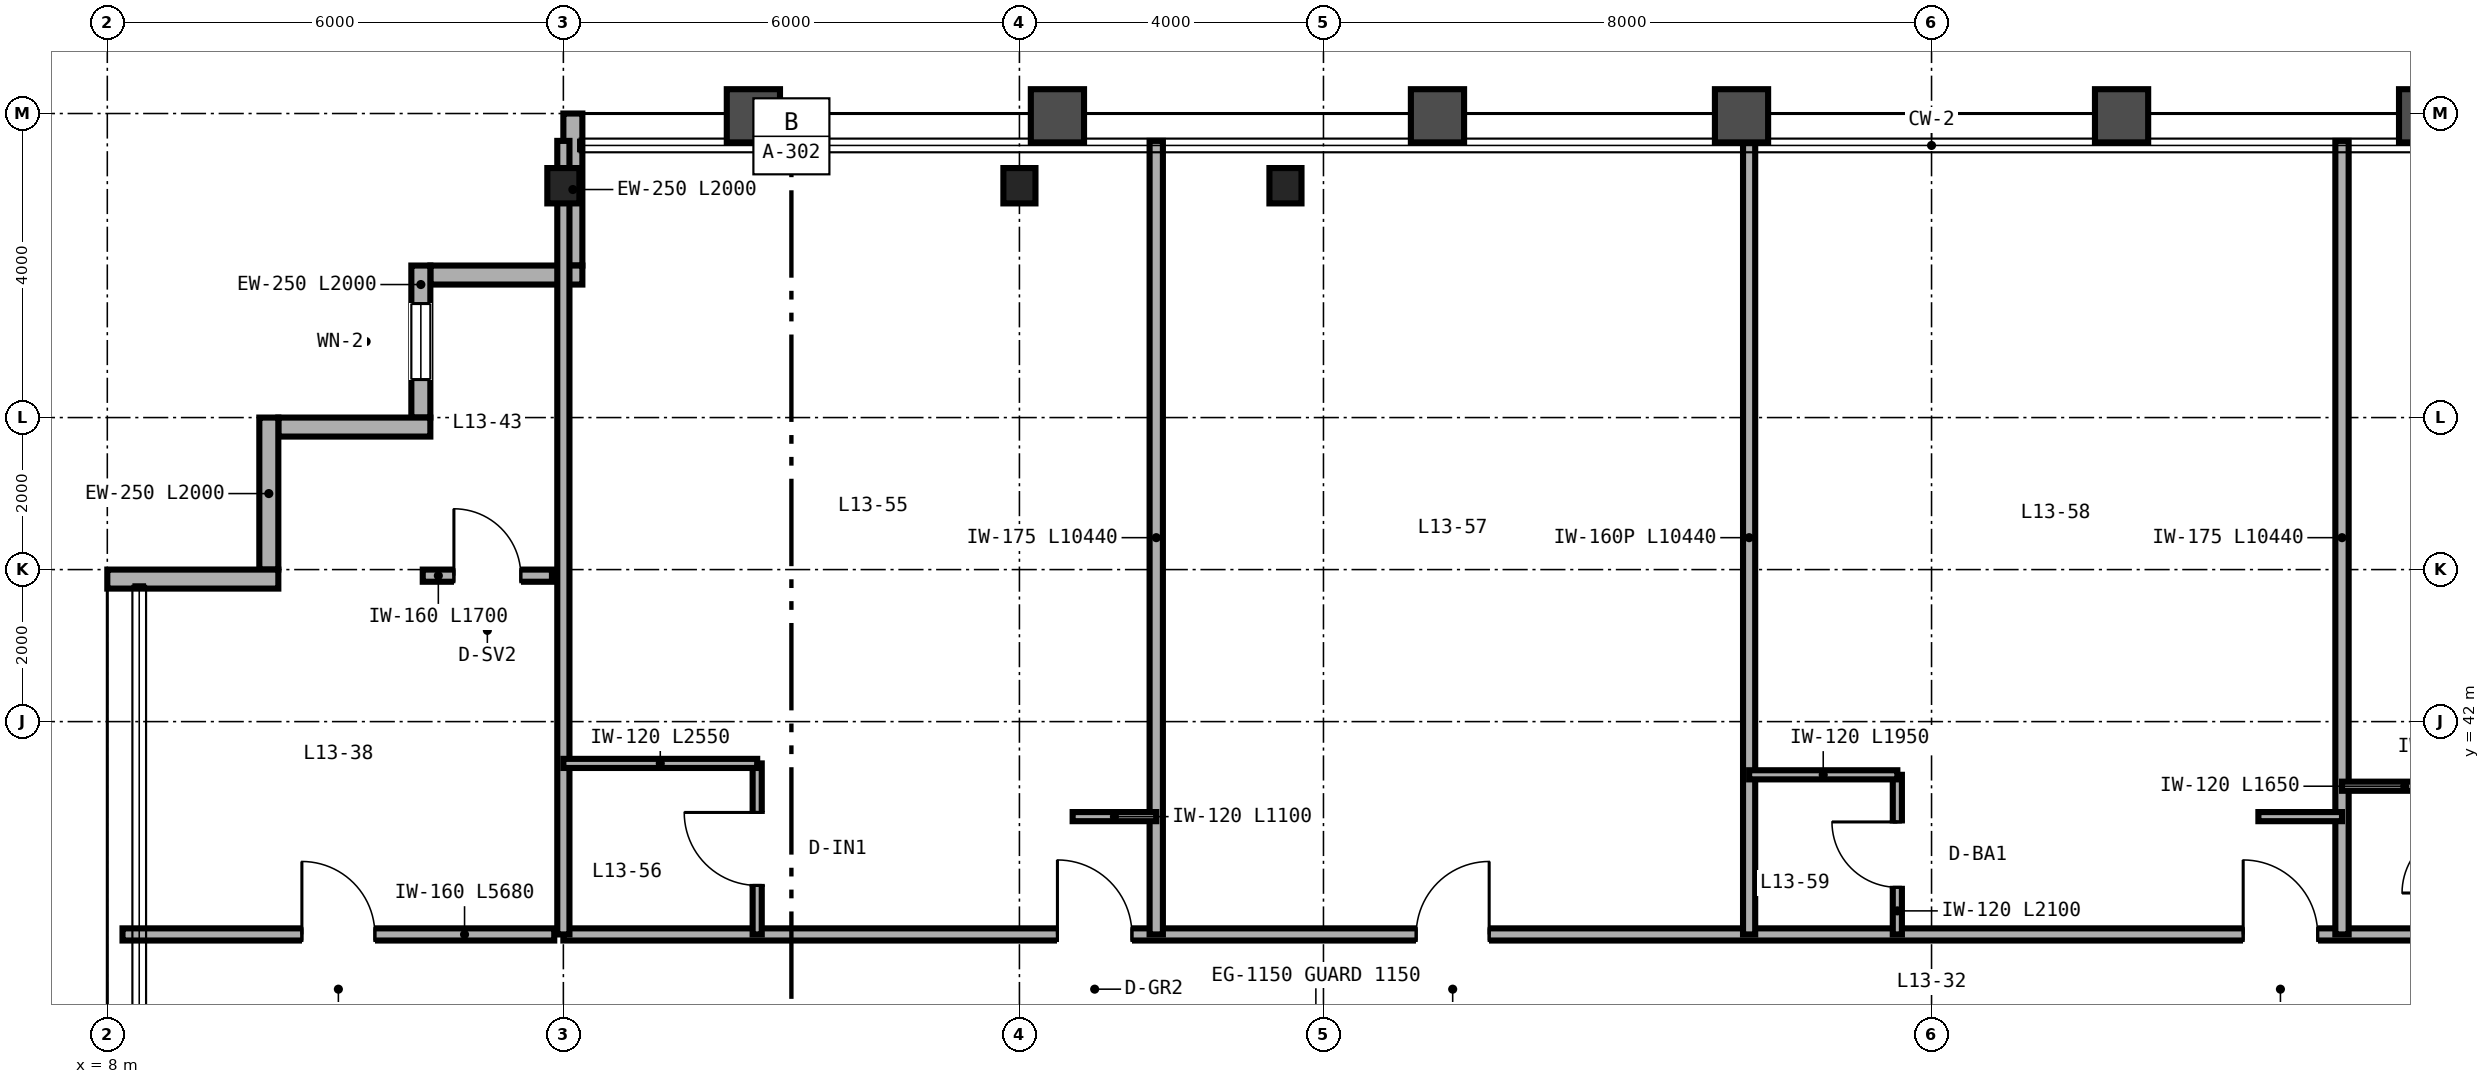
"""IFC4 building model, lengths in metres.
Left out: names, types, materials, properties, quantities, classifications, styles, units other than length and angle.
Written with IfcOpenShell. Run it as: python <this file> out.ifc"""

import sys

from ifc_helpers import new_model, si_unit, direction, frame, frame_2d, origin, origin_2d, place, context, subcontext, project, spatial, rectangle, i_section, extrude, source, transform, mapped, element, fill, save


model = new_model("IFC4")
c1 = context("Model", 3, precision=1e-05, world=origin(), true_north=direction((0.0, 1.0)))
c2 = subcontext(c1, "Body", "Model", "MODEL_VIEW")
j1 = project(units=[si_unit("LENGTHUNIT", "METRE"), si_unit("PLANEANGLEUNIT", "RADIAN")], contexts=[c1])
p1 = place(None, origin())
s1 = spatial("IfcSite", under=j1, at=p1, CompositionType="ELEMENT")
p2 = place(p1, origin())
s2 = spatial("IfcBuilding", under=s1, at=p2, CompositionType="ELEMENT")
p3 = place(p2, frame((0.0, 0.0, 56.4)))
s3 = spatial("IfcBuildingStorey", under=s2, at=p3, CompositionType="ELEMENT", Elevation=56.4)
m1 = source(origin(), c2, "Body", "SweptSolid", [
    extrude(i_section(OverallWidth=0.422, OverallDepth=0.465, WebThickness=0.045, FlangeThickness=0.073, FilletRadius=0.025, at=origin_2d()), origin(), (0.0, 0.0, 1.0), 3.35),
])
for number, where, z_axis, x_axis in (
    (1, (14.0, 49.05, 0.0), (0.0, 0.0, 1.0), (1.0, 0.0, 0.0)),
    (2, (20.0, 49.05, 0.0), (0.0, 0.0, 1.0), (1.0, 0.0, 0.0)),
    (3, (23.5, 49.05, 0.0), (0.0, 0.0, 1.0), (1.0, 0.0, 0.0)),
):
    element("IfcColumn", number, at=place(p3, frame(where, z_axis=z_axis, x_axis=x_axis)), inside=s3, PredefinedType="COLUMN", context=c2, shape_type="MappedRepresentation", body=[
        mapped(m1, transform((0.0, 0.0, 0.0), scale=1.0)),
    ])
p4 = place(p3, frame((14.125, 50.0, 0.0), z_axis=(0.0, 0.0, 1.0), x_axis=(0.0, -1.0, 0.0)))
e4 = element("IfcWall", 4, at=p4, inside=s3, PredefinedType="SOLIDWALL", context=c2, shape_type="SweptSolid", body=[
    extrude(rectangle(XDim=2.0, YDim=0.25, at=frame_2d((1.0, 0.0))), origin(), (0.0, 0.0, 1.0), 2.657),
])
p5 = place(p3, frame((14.25, 47.875, 0.0), z_axis=(0.0, 0.0, 1.0), x_axis=(-1.0, 0.0, 0.0)))
e5 = element("IfcWall", 5, at=p5, inside=s3, PredefinedType="SOLIDWALL", context=c2, shape_type="SweptSolid", body=[
    extrude(rectangle(XDim=2.0, YDim=0.25, at=frame_2d((1.0, 0.0))), origin(), (0.0, 0.0, 1.0), 3.35),
])
p6 = place(p3, frame((12.125, 48.0, 0.0), z_axis=(0.0, 0.0, 1.0), x_axis=(0.0, -1.0, 0.0)))
e6 = element("IfcWall", 6, at=p6, inside=s3, PredefinedType="SOLIDWALL", context=c2, shape_type="SweptSolid", body=[
    extrude(rectangle(XDim=2.0, YDim=0.25, at=frame_2d((1.0, 0.0))), origin(), (0.0, 0.0, 1.0), 3.35),
])
p7 = place(p6, frame((0.5, 0.0, 0.85)))
e7 = element("IfcOpeningElement", 7, at=p7, cuts=e6, PredefinedType="OPENING", context=c2, shape_type="SweptSolid", body=[
    extrude(rectangle(XDim=1.0, YDim=1.9, at=frame_2d((0.5, 0.95))), frame((0.0, 0.135, 0.0), z_axis=(0.0, -1.0, 0.0), x_axis=(1.0, 0.0, 0.0)), (0.0, 0.0, 1.0), 0.27),
])
for number, where, z_axis, x_axis in (
    (8, (12.25, 45.875, 0.0), (0.0, 0.0, 1.0), (-1.0, 0.0, 0.0)),
    (9, (10.125, 46.0, 0.0), (0.0, 0.0, 1.0), (0.0, -1.0, 0.0)),
):
    element("IfcWall", number, at=place(p3, frame(where, z_axis=z_axis, x_axis=x_axis)), inside=s3, PredefinedType="SOLIDWALL", context=c2, shape_type="SweptSolid", body=[
        extrude(rectangle(XDim=2.0, YDim=0.25, at=frame_2d((1.0, 0.0))), origin(), (0.0, 0.0, 1.0), 3.35),
    ])
p8 = place(p3, frame((10.25, 43.875, 0.0), z_axis=(0.0, 0.0, 1.0), x_axis=(-1.0, 0.0, 0.0)))
e10 = element("IfcWall", 10, at=p8, inside=s3, PredefinedType="SOLIDWALL", context=c2, shape_type="SweptSolid", body=[
    extrude(rectangle(XDim=2.25, YDim=0.25, at=frame_2d((1.125, 0.0))), origin(), (0.0, 0.0, 1.0), 3.35),
])
p9 = place(p3, frame((8.2, 39.2, 0.0), z_axis=(0.0, 0.0, 1.0), x_axis=(1.0, 0.0, 0.0)))
e11 = element("IfcWall", 11, at=p9, inside=s3, PredefinedType="PARTITIONING", context=c2, shape_type="SweptSolid", body=[
    extrude(rectangle(XDim=5.68, YDim=0.16, at=frame_2d((2.84, 0.0))), origin(), (0.0, 0.0, 1.0), 3.35),
])
p10 = place(p9, frame((2.36, 0.0, 0.0)))
e12 = element("IfcOpeningElement", 12, at=p10, cuts=e11, PredefinedType="OPENING", context=c2, shape_type="SweptSolid", body=[
    extrude(rectangle(XDim=0.96, YDim=2.15, at=frame_2d((0.48, 1.075))), frame((0.0, 0.09, 0.0), z_axis=(0.0, -1.0, 0.0), x_axis=(1.0, 0.0, 0.0)), (0.0, 0.0, 1.0), 0.18),
])
p11 = place(p3, frame((12.15, 43.92, 0.0), z_axis=(0.0, 0.0, 1.0), x_axis=(1.0, 0.0, 0.0)))
e13 = element("IfcWall", 13, at=p11, inside=s3, PredefinedType="PARTITIONING", context=c2, shape_type="SweptSolid", body=[
    extrude(rectangle(XDim=1.7, YDim=0.16, at=frame_2d((0.85, 0.0))), origin(), (0.0, 0.0, 1.0), 3.35),
])
p12 = place(p11, frame((0.41, 0.0, 0.0)))
e14 = element("IfcOpeningElement", 14, at=p12, cuts=e13, PredefinedType="OPENING", context=c2, shape_type="SweptSolid", body=[
    extrude(rectangle(XDim=0.88, YDim=2.15, at=frame_2d((0.44, 1.075))), frame((0.0, 0.09, 0.0), z_axis=(0.0, -1.0, 0.0), x_axis=(1.0, 0.0, 0.0)), (0.0, 0.0, 1.0), 0.18),
])
p13 = place(p3, frame((14.0, 39.2, 0.0), z_axis=(0.0, 0.0, 1.0), x_axis=(1.0, 0.0, 0.0)))
e15 = element("IfcWall", 15, at=p13, inside=s3, PredefinedType="PARTITIONING", context=c2, shape_type="SweptSolid", body=[
    extrude(rectangle(XDim=36.0, YDim=0.16, at=frame_2d((18.0, 0.0))), origin(), (0.0, 0.0, 1.0), 2.571),
])
p14 = place(p13, frame((6.5, 0.0, 0.0)))
e16 = element("IfcOpeningElement", 16, at=p14, cuts=e15, PredefinedType="OPENING", context=c2, shape_type="SweptSolid", body=[
    extrude(rectangle(XDim=0.98, YDim=2.2, at=frame_2d((0.49, 1.1))), frame((0.0, 0.09, 0.0), z_axis=(0.0, -1.0, 0.0), x_axis=(1.0, 0.0, 0.0)), (0.0, 0.0, 1.0), 0.18),
])
p15 = place(p13, frame((11.22, 0.0, 0.0)))
e17 = element("IfcOpeningElement", 17, at=p15, cuts=e15, PredefinedType="OPENING", context=c2, shape_type="SweptSolid", body=[
    extrude(rectangle(XDim=0.96, YDim=2.15, at=frame_2d((0.48, 1.075))), frame((0.0, 0.09, 0.0), z_axis=(0.0, -1.0, 0.0), x_axis=(1.0, 0.0, 0.0)), (0.0, 0.0, 1.0), 0.18),
])
p16 = place(p13, frame((22.1, 0.0, 0.0)))
e18 = element("IfcOpeningElement", 18, at=p16, cuts=e15, PredefinedType="OPENING", context=c2, shape_type="SweptSolid", body=[
    extrude(rectangle(XDim=0.98, YDim=2.2, at=frame_2d((0.49, 1.1))), frame((0.0, 0.09, 0.0), z_axis=(0.0, -1.0, 0.0), x_axis=(1.0, 0.0, 0.0)), (0.0, 0.0, 1.0), 0.18),
])
p17 = place(p13, frame((28.94, 0.0, 0.0)))
e19 = element("IfcOpeningElement", 19, at=p17, cuts=e15, PredefinedType="OPENING", context=c2, shape_type="SweptSolid", body=[
    extrude(rectangle(XDim=0.94, YDim=2.15, at=frame_2d((0.47, 1.075))), frame((0.0, 0.09, 0.0), z_axis=(0.0, -1.0, 0.0), x_axis=(1.0, 0.0, 0.0)), (0.0, 0.0, 1.0), 0.18),
])
p18 = place(p13, frame((34.74, 0.0, 0.0)))
e20 = element("IfcOpeningElement", 20, at=p18, cuts=e15, PredefinedType="OPENING", context=c2, shape_type="SweptSolid", body=[
    extrude(rectangle(XDim=0.94, YDim=2.15, at=frame_2d((0.47, 1.075))), frame((0.0, 0.09, 0.0), z_axis=(0.0, -1.0, 0.0), x_axis=(1.0, 0.0, 0.0)), (0.0, 0.0, 1.0), 0.18),
])
p19 = place(p3, frame((14.0, 39.2, 0.0), z_axis=(0.0, 0.0, 1.0), x_axis=(0.0, 1.0, 0.0)))
e21 = element("IfcWall", 21, at=p19, inside=s3, PredefinedType="PARTITIONING", context=c2, shape_type="SweptSolid", body=[
    extrude(rectangle(XDim=10.44, YDim=0.16, at=frame_2d((5.22, 0.0))), origin(), (0.0, 0.0, 1.0), 2.657),
])
p20 = place(p3, frame((21.8, 39.2, 0.0), z_axis=(0.0, 0.0, 1.0), x_axis=(0.0, 1.0, 0.0)))
e22 = element("IfcWall", 22, at=p20, inside=s3, PredefinedType="PARTITIONING", context=c2, shape_type="SweptSolid", body=[
    extrude(rectangle(XDim=10.44, YDim=0.175, at=frame_2d((5.22, 0.0))), origin(), (0.0, 0.0, 1.0), 2.813),
])
p21 = place(p3, frame((16.55, 39.2, 0.0), z_axis=(0.0, 0.0, 1.0), x_axis=(0.0, 1.0, 0.0)))
e23 = element("IfcWall", 23, at=p21, inside=s3, PredefinedType="PARTITIONING", context=c2, shape_type="SweptSolid", body=[
    extrude(rectangle(XDim=2.25, YDim=0.12, at=frame_2d((1.125, 0.0))), origin(), (0.0, 0.0, 1.0), 3.35),
])
p22 = place(p21, frame((0.645, 0.0, 0.0)))
e24 = element("IfcOpeningElement", 24, at=p22, cuts=e23, PredefinedType="OPENING", context=c2, shape_type="SweptSolid", body=[
    extrude(rectangle(XDim=0.96, YDim=2.15, at=frame_2d((0.48, 1.075))), frame((0.0, 0.07, 0.0), z_axis=(0.0, -1.0, 0.0), x_axis=(1.0, 0.0, 0.0)), (0.0, 0.0, 1.0), 0.14),
])
p23 = place(p3, frame((14.0, 41.45, 0.0), z_axis=(0.0, 0.0, 1.0), x_axis=(1.0, 0.0, 0.0)))
e25 = element("IfcWall", 25, at=p23, inside=s3, PredefinedType="PARTITIONING", context=c2, shape_type="SweptSolid", body=[
    extrude(rectangle(XDim=2.55, YDim=0.12, at=frame_2d((1.275, 0.0))), origin(), (0.0, 0.0, 1.0), 3.35),
])
p24 = place(p3, frame((20.7, 40.75, 0.0), z_axis=(0.0, 0.0, 1.0), x_axis=(1.0, 0.0, 0.0)))
e26 = element("IfcWall", 26, at=p24, inside=s3, PredefinedType="PARTITIONING", context=c2, shape_type="SweptSolid", body=[
    extrude(rectangle(XDim=1.1, YDim=0.12, at=frame_2d((0.55, 0.0))), origin(), (0.0, 0.0, 1.0), 3.35),
])
p25 = place(p3, frame((29.6, 39.2, 0.0), z_axis=(0.0, 0.0, 1.0), x_axis=(0.0, 1.0, 0.0)))
e27 = element("IfcWall", 27, at=p25, inside=s3, PredefinedType="PARTITIONING", context=c2, shape_type="SweptSolid", body=[
    extrude(rectangle(XDim=10.44, YDim=0.16, at=frame_2d((5.22, 0.0))), origin(), (0.0, 0.0, 1.0), 2.423),
])
p26 = place(p3, frame((37.4, 39.2, 0.0), z_axis=(0.0, 0.0, 1.0), x_axis=(0.0, 1.0, 0.0)))
e28 = element("IfcWall", 28, at=p26, inside=s3, PredefinedType="PARTITIONING", context=c2, shape_type="SweptSolid", body=[
    extrude(rectangle(XDim=10.44, YDim=0.175, at=frame_2d((5.22, 0.0))), origin(), (0.0, 0.0, 1.0), 2.423),
])
p27 = place(p3, frame((31.55, 39.2, 0.0), z_axis=(0.0, 0.0, 1.0), x_axis=(0.0, 1.0, 0.0)))
e29 = element("IfcWall", 29, at=p27, inside=s3, PredefinedType="PARTITIONING", context=c2, shape_type="SweptSolid", body=[
    extrude(rectangle(XDim=2.1, YDim=0.12, at=frame_2d((1.05, 0.0))), origin(), (0.0, 0.0, 1.0), 3.35),
])
p28 = place(p27, frame((0.62, 0.0, 0.0)))
e30 = element("IfcOpeningElement", 30, at=p28, cuts=e29, PredefinedType="OPENING", context=c2, shape_type="SweptSolid", body=[
    extrude(rectangle(XDim=0.86, YDim=2.1, at=frame_2d((0.43, 1.05))), frame((0.0, 0.07, 0.0), z_axis=(0.0, -1.0, 0.0), x_axis=(1.0, 0.0, 0.0)), (0.0, 0.0, 1.0), 0.14),
])
p29 = place(p3, frame((29.6, 41.3, 0.0), z_axis=(0.0, 0.0, 1.0), x_axis=(1.0, 0.0, 0.0)))
e31 = element("IfcWall", 31, at=p29, inside=s3, PredefinedType="PARTITIONING", context=c2, shape_type="SweptSolid", body=[
    extrude(rectangle(XDim=1.95, YDim=0.12, at=frame_2d((0.975, 0.0))), origin(), (0.0, 0.0, 1.0), 3.35),
])
p30 = place(p3, frame((36.3, 40.75, 0.0), z_axis=(0.0, 0.0, 1.0), x_axis=(1.0, 0.0, 0.0)))
e32 = element("IfcWall", 32, at=p30, inside=s3, PredefinedType="PARTITIONING", context=c2, shape_type="SweptSolid", body=[
    extrude(rectangle(XDim=1.1, YDim=0.12, at=frame_2d((0.55, 0.0))), origin(), (0.0, 0.0, 1.0), 3.35),
])
p31 = place(p3, frame((37.4, 41.15, 0.0), z_axis=(0.0, 0.0, 1.0), x_axis=(1.0, 0.0, 0.0)))
e33 = element("IfcWall", 33, at=p31, inside=s3, PredefinedType="PARTITIONING", context=c2, shape_type="SweptSolid", body=[
    extrude(rectangle(XDim=1.65, YDim=0.12, at=frame_2d((0.825, 0.0))), origin(), (0.0, 0.0, 1.0), 3.35),
])
m2 = source(origin(), c2, "Body", "SweptSolid", [
    extrude(rectangle(XDim=1.0, YDim=1.9, at=frame_2d((0.5, 0.95))), frame((0.0, 0.03, 0.0), z_axis=(0.0, -1.0, 0.0), x_axis=(1.0, 0.0, 0.0)), (0.0, 0.0, 1.0), 0.06),
])
p32 = place(p7, origin())
e34 = element("IfcWindow", 34, at=p32, inside=s3, PartitioningType="SINGLE_PANEL", PredefinedType="WINDOW", context=c2, shape_type="MappedRepresentation", body=[
    mapped(m2, transform((0.0, 0.0, 0.0), scale=1.0)),
])
fill(e7, e34)
m3 = source(origin(), c2, "Body", "SweptSolid", [
    extrude(rectangle(XDim=0.96, YDim=2.15, at=frame_2d((0.48, 1.075))), frame((0.0, 0.025, 0.0), z_axis=(0.0, -1.0, 0.0), x_axis=(1.0, 0.0, 0.0)), (0.0, 0.0, 1.0), 0.05),
])
p33 = place(p10, origin())
e35 = element("IfcDoor", 35, at=p33, inside=s3, OperationType="SINGLE_SWING_LEFT", PredefinedType="DOOR", context=c2, shape_type="MappedRepresentation", body=[
    mapped(m3, transform((0.0, 0.0, 0.0), scale=1.0)),
])
fill(e12, e35)
m4 = source(origin(), c2, "Body", "SweptSolid", [
    extrude(rectangle(XDim=0.88, YDim=2.15, at=frame_2d((0.44, 1.075))), frame((0.0, 0.025, 0.0), z_axis=(0.0, -1.0, 0.0), x_axis=(1.0, 0.0, 0.0)), (0.0, 0.0, 1.0), 0.05),
])
p34 = place(p12, origin())
e36 = element("IfcDoor", 36, at=p34, inside=s3, OperationType="SINGLE_SWING_LEFT", PredefinedType="DOOR", context=c2, shape_type="MappedRepresentation", body=[
    mapped(m4, transform((0.0, 0.0, 0.0), scale=1.0)),
])
fill(e14, e36)
p35 = place(p22, origin())
e37 = element("IfcDoor", 37, at=p35, inside=s3, OperationType="SINGLE_SWING_RIGHT", PredefinedType="DOOR", context=c2, shape_type="MappedRepresentation", body=[
    mapped(m3, transform((0.0, 0.0, 0.0), scale=1.0)),
])
fill(e24, e37)
m5 = source(origin(), c2, "Body", "SweptSolid", [
    extrude(rectangle(XDim=0.86, YDim=2.1, at=frame_2d((0.43, 1.05))), frame((0.0, 0.025, 0.0), z_axis=(0.0, -1.0, 0.0), x_axis=(1.0, 0.0, 0.0)), (0.0, 0.0, 1.0), 0.05),
])
p36 = place(p28, origin())
e38 = element("IfcDoor", 38, at=p36, inside=s3, OperationType="SINGLE_SWING_RIGHT", PredefinedType="DOOR", context=c2, shape_type="MappedRepresentation", body=[
    mapped(m5, transform((0.0, 0.0, 0.0), scale=1.0)),
])
fill(e30, e38)
m6 = source(origin(), c2, "Body", "SweptSolid", [
    extrude(rectangle(XDim=0.98, YDim=2.2, at=frame_2d((0.49, 1.1))), frame((0.0, 0.025, 0.0), z_axis=(0.0, -1.0, 0.0), x_axis=(1.0, 0.0, 0.0)), (0.0, 0.0, 1.0), 0.05),
])
p37 = place(p14, origin())
e39 = element("IfcDoor", 39, at=p37, inside=s3, OperationType="SINGLE_SWING_LEFT", PredefinedType="DOOR", context=c2, shape_type="MappedRepresentation", body=[
    mapped(m6, transform((0.0, 0.0, 0.0), scale=1.0)),
])
fill(e16, e39)
p38 = place(p15, origin())
e40 = element("IfcDoor", 40, at=p38, inside=s3, OperationType="SINGLE_SWING_RIGHT", PredefinedType="DOOR", context=c2, shape_type="MappedRepresentation", body=[
    mapped(m3, transform((0.0, 0.0, 0.0), scale=1.0)),
])
fill(e17, e40)
p39 = place(p16, origin())
e41 = element("IfcDoor", 41, at=p39, inside=s3, OperationType="SINGLE_SWING_LEFT", PredefinedType="DOOR", context=c2, shape_type="MappedRepresentation", body=[
    mapped(m6, transform((0.0, 0.0, 0.0), scale=1.0)),
])
fill(e18, e41)
save(model, sys.argv[1])
